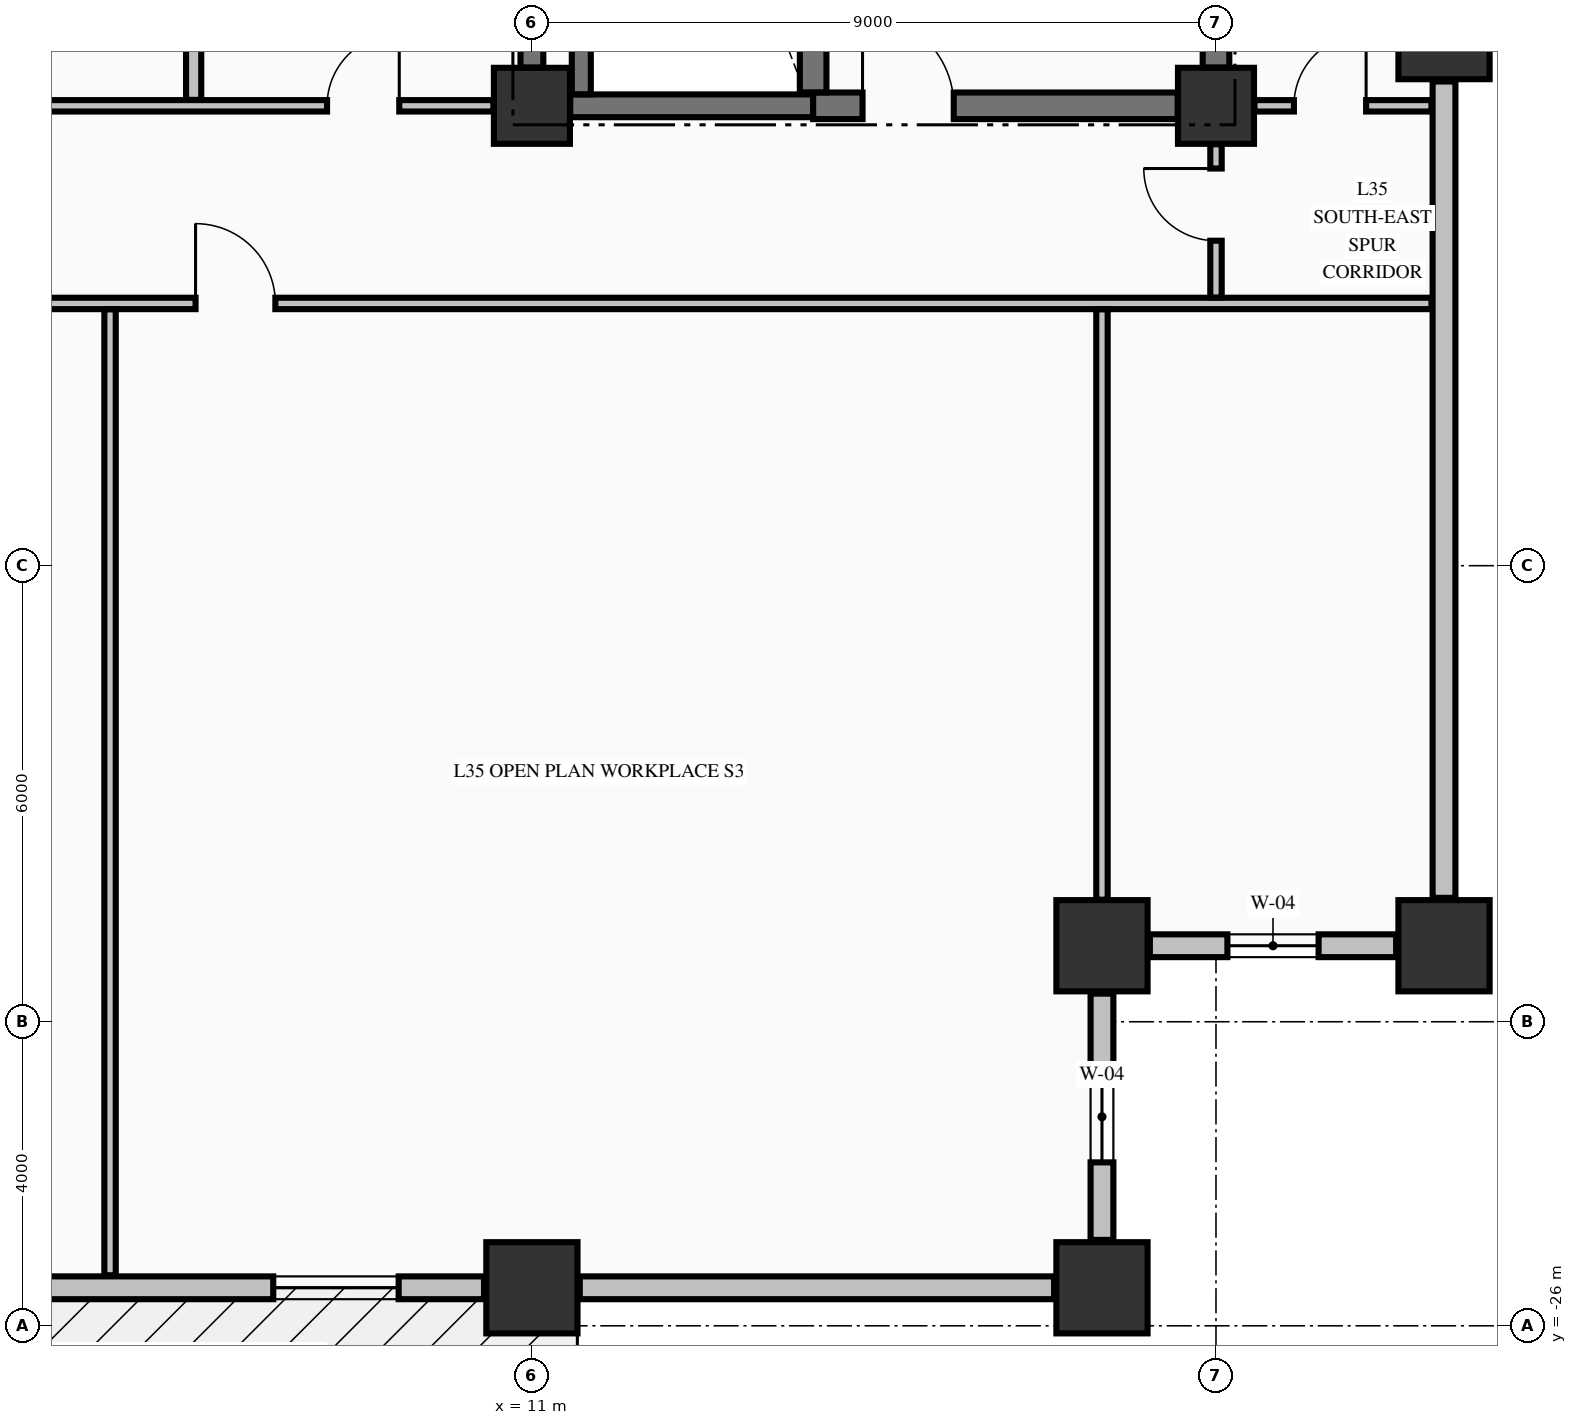
"""IFC4 building model, lengths in metres.
Left out: names, types, materials, properties, quantities, classifications, styles, units other than length and angle.
Written with IfcOpenShell. Run it as: python <this file> out.ifc"""

import sys

from ifc_helpers import new_model, si_unit, direction, frame, frame_2d, origin, origin_2d, place, context, subcontext, project, spatial, rectangle, extrude, element, fill, save


model = new_model("IFC4")
c1 = context("Model", 3, precision=1e-05, world=origin(), true_north=direction((0.0, 1.0)))
c2 = subcontext(c1, "Body", "Model", "MODEL_VIEW")
j1 = project(units=[si_unit("LENGTHUNIT", "METRE"), si_unit("PLANEANGLEUNIT", "RADIAN")], contexts=[c1])
p1 = place(None, origin())
s1 = spatial("IfcSite", under=j1, at=p1, CompositionType="ELEMENT")
p2 = place(p1, origin())
s2 = spatial("IfcBuilding", under=s1, at=p2, CompositionType="ELEMENT")
p3 = place(p2, frame((0.0, 0.0, 139.2)))
s3 = spatial("IfcBuildingStorey", under=s2, at=p3, CompositionType="ELEMENT", Elevation=139.2)
for number, where, z_axis, x_axis in (
    (1, (11.0, -25.5, -0.25), (0.0, 0.0, 1.0), (1.0, 0.0, 0.0)),
    (2, (18.5, -25.5, -0.25), (0.0, 0.0, 1.0), (1.0, 0.0, 0.0)),
    (3, (23.0, -21.0, -0.25), (0.0, 0.0, 1.0), (1.0, 0.0, 0.0)),
    (4, (23.0, -9.0, -0.25), (0.0, 0.0, 1.0), (1.0, 0.0, 0.0)),
    (5, (18.5, -21.0, -0.25), (0.0, 0.0, 1.0), (1.0, 0.0, 0.0)),
):
    element("IfcColumn", number, at=place(p3, frame(where, z_axis=z_axis, x_axis=x_axis)), inside=s3, PredefinedType="COLUMN", context=c2, shape_type="SweptSolid", body=[
        extrude(rectangle(XDim=1.2, YDim=1.2, at=origin_2d()), origin(), (0.0, 0.0, 1.0), 3.495),
    ])
for number, where, z_axis, x_axis in (
    (6, (11.0, -9.95, -0.25), (0.0, 0.0, 1.0), (1.0, 0.0, 0.0)),
    (7, (20.0, -9.95, -0.25), (0.0, 0.0, 1.0), (1.0, 0.0, 0.0)),
):
    element("IfcColumn", number, at=place(p3, frame(where, z_axis=z_axis, x_axis=x_axis)), inside=s3, PredefinedType="COLUMN", context=c2, shape_type="SweptSolid", body=[
        extrude(rectangle(XDim=1.0, YDim=1.0, at=origin_2d()), origin(), (0.0, 0.0, 1.0), 3.495),
    ])
p4 = place(p3, frame((18.5, -24.87, 0.0), z_axis=(0.0, 0.0, 1.0), x_axis=(0.0, 1.0, 0.0)))
e8 = element("IfcWall", 8, at=p4, inside=s3, PredefinedType="STANDARD", context=c2, shape_type="SweptSolid", body=[
    extrude(rectangle(XDim=3.24, YDim=0.3, at=frame_2d((1.62, 0.0))), origin(), (0.0, 0.0, 1.0), 2.637),
])
p5 = place(p4, frame((1.02, 0.0, 0.82)))
e9 = element("IfcOpeningElement", 9, at=p5, cuts=e8, PredefinedType="OPENING", context=c2, shape_type="SweptSolid", body=[
    extrude(rectangle(XDim=1.2, YDim=1.65, at=frame_2d((0.6, 0.825))), frame((0.0, 0.16, 0.0), z_axis=(0.0, -1.0, 0.0), x_axis=(1.0, 0.0, 0.0)), (0.0, 0.0, 1.0), 0.32),
])
p6 = place(p3, frame((19.13, -21.0, 0.0), z_axis=(0.0, 0.0, 1.0), x_axis=(1.0, 0.0, 0.0)))
e10 = element("IfcWall", 10, at=p6, inside=s3, PredefinedType="STANDARD", context=c2, shape_type="SweptSolid", body=[
    extrude(rectangle(XDim=3.24, YDim=0.3, at=frame_2d((1.62, 0.0))), origin(), (0.0, 0.0, 1.0), 2.637),
])
p7 = place(p6, frame((1.02, 0.0, 0.82)))
e11 = element("IfcOpeningElement", 11, at=p7, cuts=e10, PredefinedType="OPENING", context=c2, shape_type="SweptSolid", body=[
    extrude(rectangle(XDim=1.2, YDim=1.65, at=frame_2d((0.6, 0.825))), frame((0.0, 0.16, 0.0), z_axis=(0.0, -1.0, 0.0), x_axis=(1.0, 0.0, 0.0)), (0.0, 0.0, 1.0), 0.32),
])
p8 = place(p3, frame((0.63, -25.5, 0.0), z_axis=(0.0, 0.0, 1.0), x_axis=(1.0, 0.0, 0.0)))
e12 = element("IfcWall", 12, at=p8, inside=s3, PredefinedType="STANDARD", context=c2, shape_type="SweptSolid", body=[
    extrude(rectangle(XDim=9.74, YDim=0.3, at=frame_2d((4.87, 0.0))), origin(), (0.0, 0.0, 1.0), 2.637),
])
p9 = place(p8, frame((1.123, 0.0, 0.8)))
e13 = element("IfcOpeningElement", 13, at=p9, cuts=e12, PredefinedType="OPENING", context=c2, shape_type="SweptSolid", body=[
    extrude(rectangle(XDim=1.65, YDim=1.7, at=frame_2d((0.825, 0.85))), frame((0.0, 0.16, 0.0), z_axis=(0.0, -1.0, 0.0), x_axis=(1.0, 0.0, 0.0)), (0.0, 0.0, 1.0), 0.32),
])
p10 = place(p8, frame((6.967, 0.0, 0.8)))
e14 = element("IfcOpeningElement", 14, at=p10, cuts=e12, PredefinedType="OPENING", context=c2, shape_type="SweptSolid", body=[
    extrude(rectangle(XDim=1.65, YDim=1.7, at=frame_2d((0.825, 0.85))), frame((0.0, 0.16, 0.0), z_axis=(0.0, -1.0, 0.0), x_axis=(1.0, 0.0, 0.0)), (0.0, 0.0, 1.0), 0.32),
])
p11 = place(p3, frame((11.63, -25.5, 0.0), z_axis=(0.0, 0.0, 1.0), x_axis=(1.0, 0.0, 0.0)))
e15 = element("IfcWall", 15, at=p11, inside=s3, PredefinedType="STANDARD", context=c2, shape_type="SweptSolid", body=[
    extrude(rectangle(XDim=6.24, YDim=0.3, at=frame_2d((3.12, 0.0))), origin(), (0.0, 0.0, 1.0), 2.637),
])
p12 = place(p3, frame((23.0, -20.37, 0.0), z_axis=(0.0, 0.0, 1.0), x_axis=(0.0, 1.0, 0.0)))
e16 = element("IfcWall", 16, at=p12, inside=s3, PredefinedType="STANDARD", context=c2, shape_type="SweptSolid", body=[
    extrude(rectangle(XDim=10.74, YDim=0.3, at=frame_2d((5.37, 0.0))), origin(), (0.0, 0.0, 1.0), 2.637),
])
p13 = place(p3, frame((11.504, -9.95, 0.0), z_axis=(0.0, 0.0, 1.0), x_axis=(1.0, 0.0, 0.0)))
e17 = element("IfcWall", 17, at=p13, inside=s3, PredefinedType="SHEAR", context=c2, shape_type="SweptSolid", body=[
    extrude(rectangle(XDim=3.196, YDim=0.3, at=frame_2d((1.598, 0.0))), origin(), (0.0, 0.0, 1.0), 3.245),
])
p14 = place(p3, frame((14.7, -9.95, 0.0), z_axis=(0.0, 0.0, 1.0), x_axis=(1.0, 0.0, 0.0)))
e18 = element("IfcWall", 18, at=p14, inside=s3, PredefinedType="SHEAR", context=c2, shape_type="SweptSolid", body=[
    extrude(rectangle(XDim=4.796, YDim=0.35, at=frame_2d((2.398, 0.0))), origin(), (0.0, 0.0, 1.0), 3.245),
])
p15 = place(p14, frame((0.65, 0.0, 0.0)))
e19 = element("IfcOpeningElement", 19, at=p15, cuts=e18, PredefinedType="OPENING", context=c2, shape_type="SweptSolid", body=[
    extrude(rectangle(XDim=1.2, YDim=2.15, at=frame_2d((0.6, 1.075))), frame((0.0, 0.185, 0.0), z_axis=(0.0, -1.0, 0.0), x_axis=(1.0, 0.0, 0.0)), (0.0, 0.0, 1.0), 0.37),
])
p16 = place(p3, frame((-27.835, -12.55, 0.0), z_axis=(0.0, 0.0, 1.0), x_axis=(1.0, 0.0, 0.0)))
e20 = element("IfcWall", 20, at=p16, inside=s3, PredefinedType="PARTITIONING", context=c2, shape_type="SweptSolid", body=[
    extrude(rectangle(XDim=50.67, YDim=0.15, at=frame_2d((25.335, 0.0))), origin(), (0.0, 0.0, 1.0), 3.245),
])
p17 = place(p16, frame((13.63, 0.0, 0.0)))
e21 = element("IfcOpeningElement", 21, at=p17, cuts=e20, PredefinedType="OPENING", context=c2, shape_type="SweptSolid", body=[
    extrude(rectangle(XDim=1.05, YDim=2.15, at=frame_2d((0.525, 1.075))), frame((0.0, 0.085, 0.0), z_axis=(0.0, -1.0, 0.0), x_axis=(1.0, 0.0, 0.0)), (0.0, 0.0, 1.0), 0.17),
])
p18 = place(p16, frame((31.11, 0.0, 0.0)))
e22 = element("IfcOpeningElement", 22, at=p18, cuts=e20, PredefinedType="OPENING", context=c2, shape_type="SweptSolid", body=[
    extrude(rectangle(XDim=1.05, YDim=2.15, at=frame_2d((0.525, 1.075))), frame((0.0, 0.085, 0.0), z_axis=(0.0, -1.0, 0.0), x_axis=(1.0, 0.0, 0.0)), (0.0, 0.0, 1.0), 0.17),
])
p19 = place(p16, frame((34.41, 0.0, 0.0)))
e23 = element("IfcOpeningElement", 23, at=p19, cuts=e20, PredefinedType="OPENING", context=c2, shape_type="SweptSolid", body=[
    extrude(rectangle(XDim=1.05, YDim=2.15, at=frame_2d((0.525, 1.075))), frame((0.0, 0.085, 0.0), z_axis=(0.0, -1.0, 0.0), x_axis=(1.0, 0.0, 0.0)), (0.0, 0.0, 1.0), 0.17),
])
p20 = place(p3, frame((-10.494, -9.95, 0.0), z_axis=(0.0, 0.0, 1.0), x_axis=(1.0, 0.0, 0.0)))
e24 = element("IfcWall", 24, at=p20, inside=s3, PredefinedType="PARTITIONING", context=c2, shape_type="SweptSolid", body=[
    extrude(rectangle(XDim=20.988, YDim=0.15, at=frame_2d((10.494, 0.0))), origin(), (0.0, 0.0, 1.0), 3.245),
])
p21 = place(p20, frame((12.594, 0.0, 0.0)))
e25 = element("IfcOpeningElement", 25, at=p21, cuts=e24, PredefinedType="OPENING", context=c2, shape_type="SweptSolid", body=[
    extrude(rectangle(XDim=1.1, YDim=2.15, at=frame_2d((0.55, 1.075))), frame((0.0, 0.085, 0.0), z_axis=(0.0, -1.0, 0.0), x_axis=(1.0, 0.0, 0.0)), (0.0, 0.0, 1.0), 0.17),
])
p22 = place(p20, frame((18.799, 0.0, 0.0)))
e26 = element("IfcOpeningElement", 26, at=p22, cuts=e24, PredefinedType="OPENING", context=c2, shape_type="SweptSolid", body=[
    extrude(rectangle(XDim=0.95, YDim=2.15, at=frame_2d((0.475, 1.075))), frame((0.0, 0.085, 0.0), z_axis=(0.0, -1.0, 0.0), x_axis=(1.0, 0.0, 0.0)), (0.0, 0.0, 1.0), 0.17),
])
p23 = place(p3, frame((20.506, -9.95, 0.0), z_axis=(0.0, 0.0, 1.0), x_axis=(1.0, 0.0, 0.0)))
e27 = element("IfcWall", 27, at=p23, inside=s3, PredefinedType="PARTITIONING", context=c2, shape_type="SweptSolid", body=[
    extrude(rectangle(XDim=2.329, YDim=0.15, at=frame_2d((1.165, 0.0))), origin(), (0.0, 0.0, 1.0), 3.245),
])
p24 = place(p23, frame((0.519, 0.0, 0.0)))
e28 = element("IfcOpeningElement", 28, at=p24, cuts=e27, PredefinedType="OPENING", context=c2, shape_type="SweptSolid", body=[
    extrude(rectangle(XDim=0.95, YDim=2.15, at=frame_2d((0.475, 1.075))), frame((0.0, 0.085, 0.0), z_axis=(0.0, -1.0, 0.0), x_axis=(1.0, 0.0, 0.0)), (0.0, 0.0, 1.0), 0.17),
])
p25 = place(p3, frame((11.0, -9.446, 0.0), z_axis=(0.0, 0.0, 1.0), x_axis=(0.0, 1.0, 0.0)))
e29 = element("IfcWall", 29, at=p25, inside=s3, PredefinedType="SHEAR", context=c2, shape_type="SweptSolid", body=[
    extrude(rectangle(XDim=8.942, YDim=0.3, at=frame_2d((4.471, 0.0))), origin(), (0.0, 0.0, 1.0), 3.245),
])
p26 = place(p3, frame((11.65, -9.798, 0.0), z_axis=(0.0, 0.0, 1.0), x_axis=(0.0, 1.0, 0.0)))
e30 = element("IfcWall", 30, at=p26, inside=s3, PredefinedType="SOLIDWALL", context=c2, shape_type="SweptSolid", body=[
    extrude(rectangle(XDim=9.396, YDim=0.25, at=frame_2d((4.698, 0.0))), origin(), (0.0, 0.0, 1.0), 3.245),
])
p27 = place(p3, frame((14.7, -9.773, 0.0), z_axis=(0.0, 0.0, 1.0), x_axis=(0.0, 1.0, 0.0)))
e31 = element("IfcWall", 31, at=p27, inside=s3, PredefinedType="SHEAR", context=c2, shape_type="SweptSolid", body=[
    extrude(rectangle(XDim=9.371, YDim=0.35, at=frame_2d((4.686, 0.0))), origin(), (0.0, 0.0, 1.0), 3.245),
])
p28 = place(p3, frame((20.0, -9.446, 0.0), z_axis=(0.0, 0.0, 1.0), x_axis=(0.0, 1.0, 0.0)))
e32 = element("IfcWall", 32, at=p28, inside=s3, PredefinedType="SHEAR", context=c2, shape_type="SweptSolid", body=[
    extrude(rectangle(XDim=2.269, YDim=0.35, at=frame_2d((1.135, 0.0))), origin(), (0.0, 0.0, 1.0), 3.245),
])
p29 = place(p3, frame((5.45, -25.335, 0.0), z_axis=(0.0, 0.0, 1.0), x_axis=(0.0, 1.0, 0.0)))
e33 = element("IfcWall", 33, at=p29, inside=s3, PredefinedType="PARTITIONING", context=c2, shape_type="SweptSolid", body=[
    extrude(rectangle(XDim=12.707, YDim=0.15, at=frame_2d((6.354, 0.0))), origin(), (0.0, 0.0, 1.0), 3.245),
])
p30 = place(p3, frame((6.55, -9.872, 0.0), z_axis=(0.0, 0.0, 1.0), x_axis=(0.0, 1.0, 0.0)))
e34 = element("IfcWall", 34, at=p30, inside=s3, PredefinedType="PARTITIONING", context=c2, shape_type="SweptSolid", body=[
    extrude(rectangle(XDim=5.519, YDim=0.2, at=frame_2d((2.76, 0.0))), origin(), (0.0, 0.0, 1.0), 3.245),
])
p31 = place(p3, frame((18.5, -20.394, 0.0), z_axis=(0.0, 0.0, 1.0), x_axis=(0.0, 1.0, 0.0)))
e35 = element("IfcWall", 35, at=p31, inside=s3, PredefinedType="PARTITIONING", context=c2, shape_type="SweptSolid", body=[
    extrude(rectangle(XDim=7.766, YDim=0.15, at=frame_2d((3.883, 0.0))), origin(), (0.0, 0.0, 1.0), 3.245),
])
p32 = place(p3, frame((20.0, -12.472, 0.0), z_axis=(0.0, 0.0, 1.0), x_axis=(0.0, 1.0, 0.0)))
e36 = element("IfcWall", 36, at=p32, inside=s3, PredefinedType="PARTITIONING", context=c2, shape_type="SweptSolid", body=[
    extrude(rectangle(XDim=2.016, YDim=0.15, at=frame_2d((1.008, 0.0))), origin(), (0.0, 0.0, 1.0), 2.735),
])
p33 = place(p32, frame((0.747, 0.0, 0.0)))
e37 = element("IfcOpeningElement", 37, at=p33, cuts=e36, PredefinedType="OPENING", context=c2, shape_type="SweptSolid", body=[
    extrude(rectangle(XDim=0.95, YDim=2.15, at=frame_2d((0.475, 1.075))), frame((0.0, 0.085, 0.0), z_axis=(0.0, -1.0, 0.0), x_axis=(1.0, 0.0, 0.0)), (0.0, 0.0, 1.0), 0.17),
])
p34 = place(p5, origin())
e38 = element("IfcWindow", 38, at=p34, inside=s3, PartitioningType="SINGLE_PANEL", PredefinedType="WINDOW", context=c2, shape_type="SweptSolid", body=[
    extrude(rectangle(XDim=1.2, YDim=1.65, at=frame_2d((0.6, 0.825))), frame((0.0, 0.03, 0.0), z_axis=(0.0, -1.0, 0.0), x_axis=(1.0, 0.0, 0.0)), (0.0, 0.0, 1.0), 0.06),
])
fill(e9, e38)
p35 = place(p7, origin())
e39 = element("IfcWindow", 39, at=p35, inside=s3, PartitioningType="SINGLE_PANEL", PredefinedType="WINDOW", context=c2, shape_type="SweptSolid", body=[
    extrude(rectangle(XDim=1.2, YDim=1.65, at=frame_2d((0.6, 0.825))), frame((0.0, 0.03, 0.0), z_axis=(0.0, -1.0, 0.0), x_axis=(1.0, 0.0, 0.0)), (0.0, 0.0, 1.0), 0.06),
])
fill(e11, e39)
p36 = place(p10, origin())
e40 = element("IfcWindow", 40, at=p36, inside=s3, PartitioningType="SINGLE_PANEL", PredefinedType="WINDOW", context=c2, shape_type="SweptSolid", body=[
    extrude(rectangle(XDim=1.65, YDim=1.7, at=frame_2d((0.825, 0.85))), frame((0.0, 0.03, 0.0), z_axis=(0.0, -1.0, 0.0), x_axis=(1.0, 0.0, 0.0)), (0.0, 0.0, 1.0), 0.06),
])
fill(e14, e40)
p37 = place(p15, origin())
e41 = element("IfcDoor", 41, at=p37, inside=s3, OperationType="SINGLE_SWING_LEFT", PredefinedType="DOOR", context=c2, shape_type="SweptSolid", body=[
    extrude(rectangle(XDim=1.2, YDim=2.15, at=frame_2d((0.6, 1.075))), frame((0.0, 0.025, 0.0), z_axis=(0.0, -1.0, 0.0), x_axis=(1.0, 0.0, 0.0)), (0.0, 0.0, 1.0), 0.05),
])
fill(e19, e41)
p38 = place(p19, origin())
e42 = element("IfcDoor", 42, at=p38, inside=s3, OperationType="SINGLE_SWING_LEFT", PredefinedType="DOOR", context=c2, shape_type="SweptSolid", body=[
    extrude(rectangle(XDim=1.05, YDim=2.15, at=frame_2d((0.525, 1.075))), frame((0.0, 0.025, 0.0), z_axis=(0.0, -1.0, 0.0), x_axis=(1.0, 0.0, 0.0)), (0.0, 0.0, 1.0), 0.05),
])
fill(e23, e42)
p39 = place(p22, origin())
e43 = element("IfcDoor", 43, at=p39, inside=s3, OperationType="SINGLE_SWING_RIGHT", PredefinedType="DOOR", context=c2, shape_type="SweptSolid", body=[
    extrude(rectangle(XDim=0.95, YDim=2.15, at=frame_2d((0.475, 1.075))), frame((0.0, 0.025, 0.0), z_axis=(0.0, -1.0, 0.0), x_axis=(1.0, 0.0, 0.0)), (0.0, 0.0, 1.0), 0.05),
])
fill(e26, e43)
p40 = place(p33, origin())
e44 = element("IfcDoor", 44, at=p40, inside=s3, OperationType="SINGLE_SWING_RIGHT", PredefinedType="DOOR", context=c2, shape_type="SweptSolid", body=[
    extrude(rectangle(XDim=0.95, YDim=2.15, at=frame_2d((0.475, 1.075))), frame((0.0, 0.025, 0.0), z_axis=(0.0, -1.0, 0.0), x_axis=(1.0, 0.0, 0.0)), (0.0, 0.0, 1.0), 0.05),
])
fill(e37, e44)
p41 = place(p24, origin())
e45 = element("IfcDoor", 45, at=p41, inside=s3, OperationType="SINGLE_SWING_RIGHT", PredefinedType="DOOR", context=c2, shape_type="SweptSolid", body=[
    extrude(rectangle(XDim=0.95, YDim=2.15, at=frame_2d((0.475, 1.075))), frame((0.0, 0.025, 0.0), z_axis=(0.0, -1.0, 0.0), x_axis=(1.0, 0.0, 0.0)), (0.0, 0.0, 1.0), 0.05),
])
fill(e28, e45)
save(model, sys.argv[1])
